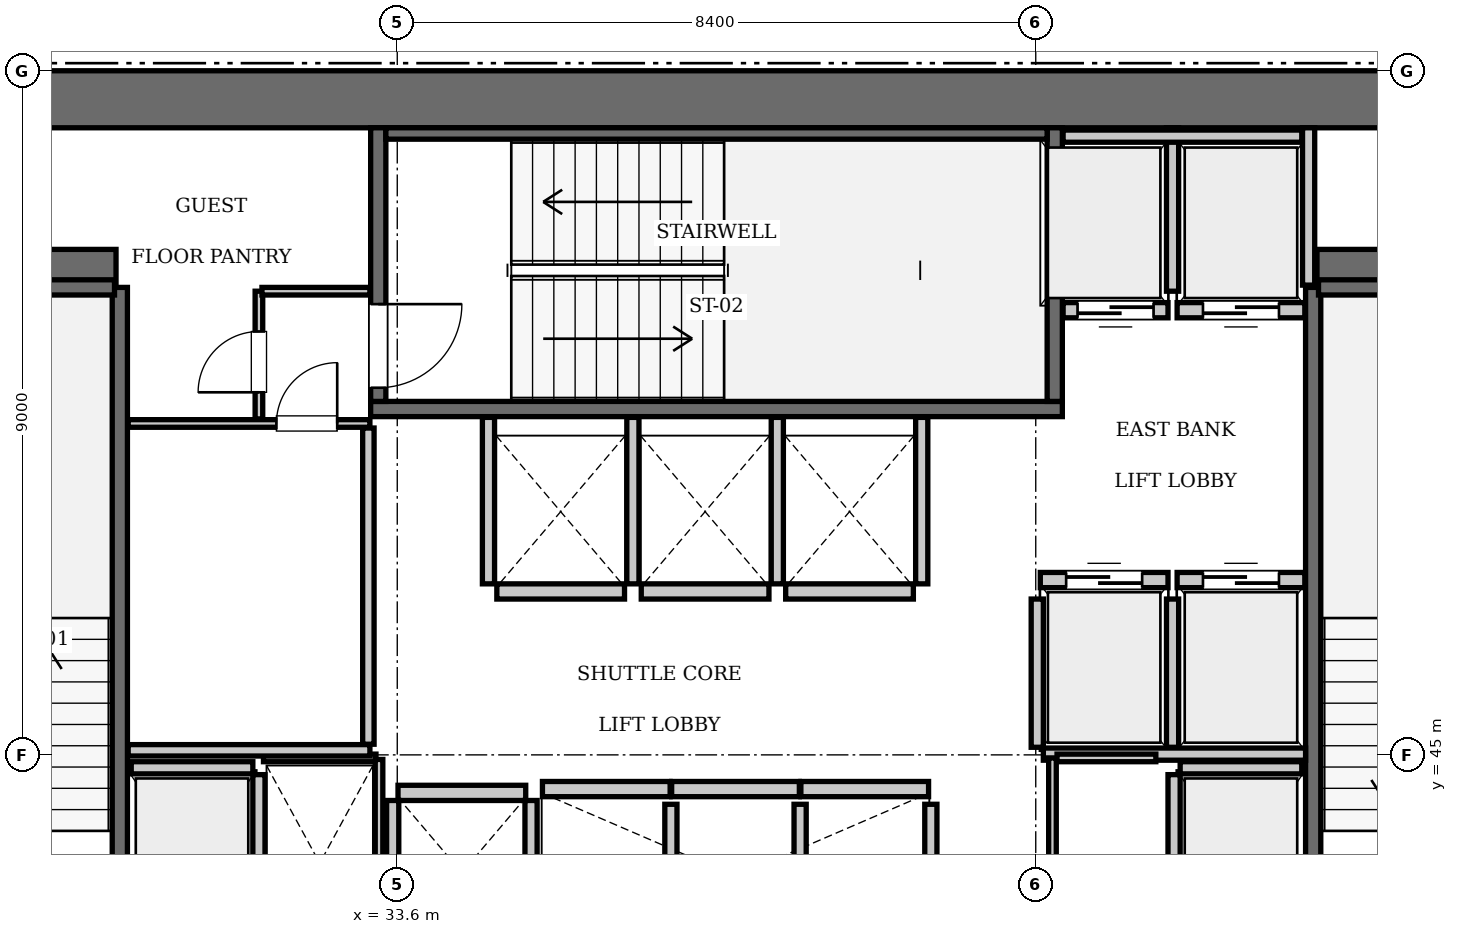
"""IFC4 building model, lengths in metres.
Left out: names, types, materials, properties, quantities, classifications, styles, units other than length and angle.
Written with IfcOpenShell. Run it as: python <this file> out.ifc"""

import sys

from ifc_helpers import new_model, si_unit, direction, frame, frame_2d, origin, place, context, subcontext, project, spatial, rectangle, extrude, element, fill, save


model = new_model("IFC4")
c1 = context("Model", 3, precision=1e-05, world=origin(), true_north=direction((0.0, 1.0)))
c2 = subcontext(c1, "Body", "Model", "MODEL_VIEW")
j1 = project(units=[si_unit("LENGTHUNIT", "METRE"), si_unit("PLANEANGLEUNIT", "RADIAN")], contexts=[c1])
p1 = place(None, origin())
s1 = spatial("IfcSite", under=j1, at=p1, CompositionType="ELEMENT")
p2 = place(p1, origin())
s2 = spatial("IfcBuilding", under=s1, at=p2, CompositionType="ELEMENT")
p3 = place(p2, frame((0.0, 0.0, 177.45)))
s3 = spatial("IfcBuildingStorey", under=s2, at=p3, CompositionType="ELEMENT", Elevation=177.45)
p4 = place(p3, frame((25.2, 53.625, 0.0), z_axis=(0.0, 0.0, 1.0), x_axis=(1.0, 0.0, 0.0)))
e1 = element("IfcWall", 1, at=p4, inside=s3, PredefinedType="SHEAR", context=c2, shape_type="SweptSolid", body=[
    extrude(rectangle(XDim=25.2, YDim=0.75, at=frame_2d((12.6, 0.0))), origin(), (0.0, 0.0, 1.0), 3.85),
])
for number, where, z_axis, x_axis in (
    (2, (25.95, 51.4, 0.0), (0.0, 0.0, 1.0), (1.0, 0.0, 0.0)),
    (3, (45.7, 51.4, 0.0), (0.0, 0.0, 1.0), (1.0, 0.0, 0.0)),
):
    element("IfcWall", number, at=place(p3, frame(where, z_axis=z_axis, x_axis=x_axis)), inside=s3, PredefinedType="SHEAR", context=c2, shape_type="SweptSolid", body=[
        extrude(rectangle(XDim=3.95, YDim=0.5, at=frame_2d((1.975, 0.0))), origin(), (0.0, 0.0, 1.0), 3.85),
    ])
p5 = place(p3, frame((29.95, 42.15, 0.0), z_axis=(0.0, 0.0, 1.0), x_axis=(0.0, 1.0, 0.0)))
e4 = element("IfcWall", 4, at=p5, inside=s3, PredefinedType="SOLIDWALL", context=c2, shape_type="SweptSolid", body=[
    extrude(rectangle(XDim=9.0, YDim=0.2, at=frame_2d((4.5, 0.0))), origin(), (0.0, 0.0, 1.0), 3.61),
])
p6 = place(p3, frame((26.38, 51.15, 0.0), z_axis=(0.0, 0.0, 1.0), x_axis=(1.0, 0.0, 0.0)))
e5 = element("IfcWall", 5, at=p6, inside=s3, PredefinedType="SOLIDWALL", context=c2, shape_type="SweptSolid", body=[
    extrude(rectangle(XDim=3.5, YDim=0.2, at=frame_2d((1.75, 0.0))), origin(), (0.0, 0.0, 1.0), 3.61),
])
p7 = place(p3, frame((33.25, 49.55, 0.0), z_axis=(0.0, 0.0, 1.0), x_axis=(1.0, 0.0, 0.0)))
e6 = element("IfcWall", 6, at=p7, inside=s3, PredefinedType="SOLIDWALL", context=c2, shape_type="SweptSolid", body=[
    extrude(rectangle(XDim=9.1, YDim=0.2, at=frame_2d((4.55, 0.0))), origin(), (0.0, 0.0, 1.0), 3.61),
])
p8 = place(p3, frame((42.25, 49.65, 0.0), z_axis=(0.0, 0.0, 1.0), x_axis=(0.0, 1.0, 0.0)))
e7 = element("IfcWall", 7, at=p8, inside=s3, PredefinedType="SOLIDWALL", context=c2, shape_type="SweptSolid", body=[
    extrude(rectangle(XDim=3.6, YDim=0.2, at=frame_2d((1.8, 0.0))), origin(), (0.0, 0.0, 1.0), 3.61),
])
p9 = place(p3, frame((33.35, 49.65, 0.0), z_axis=(0.0, 0.0, 1.0), x_axis=(0.0, 1.0, 0.0)))
e8 = element("IfcWall", 8, at=p9, inside=s3, PredefinedType="SOLIDWALL", context=c2, shape_type="SweptSolid", body=[
    extrude(rectangle(XDim=3.6, YDim=0.2, at=frame_2d((1.8, 0.0))), origin(), (0.0, 0.0, 1.0), 3.61),
])
p10 = place(p9, frame((0.18, 0.0, 0.0)))
e9 = element("IfcOpeningElement", 9, at=p10, cuts=e8, PredefinedType="OPENING", context=c2, shape_type="SweptSolid", body=[
    extrude(rectangle(XDim=1.1, YDim=2.15, at=frame_2d((0.55, 1.075))), frame((0.0, 0.11, 0.0), z_axis=(0.0, -1.0, 0.0), x_axis=(1.0, 0.0, 0.0)), (0.0, 0.0, 1.0), 0.22),
])
p11 = place(p3, frame((33.45, 53.175, 0.0), z_axis=(0.0, 0.0, 1.0), x_axis=(1.0, 0.0, 0.0)))
e10 = element("IfcWall", 10, at=p11, inside=s3, PredefinedType="SOLIDWALL", context=c2, shape_type="SweptSolid", body=[
    extrude(rectangle(XDim=8.7, YDim=0.15, at=frame_2d((4.35, 0.0))), origin(), (0.0, 0.0, 1.0), 3.61),
])
p12 = place(p3, frame((45.65, 42.15, 0.0), z_axis=(0.0, 0.0, 1.0), x_axis=(0.0, 1.0, 0.0)))
e11 = element("IfcWall", 11, at=p12, inside=s3, PredefinedType="SOLIDWALL", context=c2, shape_type="SweptSolid", body=[
    extrude(rectangle(XDim=9.0, YDim=0.2, at=frame_2d((4.5, 0.0))), origin(), (0.0, 0.0, 1.0), 3.61),
])
p13 = place(p3, frame((45.72, 51.15, 0.0), z_axis=(0.0, 0.0, 1.0), x_axis=(1.0, 0.0, 0.0)))
e12 = element("IfcWall", 12, at=p13, inside=s3, PredefinedType="SOLIDWALL", context=c2, shape_type="SweptSolid", body=[
    extrude(rectangle(XDim=3.5, YDim=0.2, at=frame_2d((1.75, 0.0))), origin(), (0.0, 0.0, 1.0), 3.61),
])
p14 = place(p3, frame((42.06, 47.3, 0.0), z_axis=(0.0, 0.0, 1.0), x_axis=(1.0, 0.0, 0.0)))
e13 = element("IfcWall", 13, at=p14, inside=s3, PredefinedType="SOLIDWALL", context=c2, shape_type="SweptSolid", body=[
    extrude(rectangle(XDim=1.68, YDim=0.2, at=frame_2d((0.84, 0.0))), origin(), (0.0, 0.0, 1.0), 3.61),
])
p15 = place(p14, frame((0.34, 0.0, 0.0)))
e14 = element("IfcOpeningElement", 14, at=p15, cuts=e13, PredefinedType="OPENING", context=c2, shape_type="SweptSolid", body=[
    extrude(rectangle(XDim=1.0, YDim=2.15, at=frame_2d((0.5, 1.075))), frame((0.0, 0.11, 0.0), z_axis=(0.0, -1.0, 0.0), x_axis=(1.0, 0.0, 0.0)), (0.0, 0.0, 1.0), 0.22),
])
p16 = place(p3, frame((43.86, 47.3, 0.0), z_axis=(0.0, 0.0, 1.0), x_axis=(1.0, 0.0, 0.0)))
e15 = element("IfcWall", 15, at=p16, inside=s3, PredefinedType="SOLIDWALL", context=c2, shape_type="SweptSolid", body=[
    extrude(rectangle(XDim=1.68, YDim=0.2, at=frame_2d((0.84, 0.0))), origin(), (0.0, 0.0, 1.0), 3.61),
])
p17 = place(p16, frame((0.34, 0.0, 0.0)))
e16 = element("IfcOpeningElement", 16, at=p17, cuts=e15, PredefinedType="OPENING", context=c2, shape_type="SweptSolid", body=[
    extrude(rectangle(XDim=1.0, YDim=2.15, at=frame_2d((0.5, 1.075))), frame((0.0, 0.11, 0.0), z_axis=(0.0, -1.0, 0.0), x_axis=(1.0, 0.0, 0.0)), (0.0, 0.0, 1.0), 0.22),
])
p18 = place(p3, frame((42.36, 50.85, 0.0), z_axis=(0.0, 0.0, 1.0), x_axis=(1.0, 0.0, 0.0)))
e17 = element("IfcWall", 17, at=p18, inside=s3, PredefinedType="SOLIDWALL", context=c2, shape_type="SweptSolid", body=[
    extrude(rectangle(XDim=1.38, YDim=0.2, at=frame_2d((0.69, 0.0))), origin(), (0.0, 0.0, 1.0), 3.61),
])
p19 = place(p18, frame((0.19, 0.0, 0.0)))
e18 = element("IfcOpeningElement", 18, at=p19, cuts=e17, PredefinedType="OPENING", context=c2, shape_type="SweptSolid", body=[
    extrude(rectangle(XDim=1.0, YDim=2.15, at=frame_2d((0.5, 1.075))), frame((0.0, 0.11, 0.0), z_axis=(0.0, -1.0, 0.0), x_axis=(1.0, 0.0, 0.0)), (0.0, 0.0, 1.0), 0.22),
])
p20 = place(p3, frame((43.86, 50.85, 0.0), z_axis=(0.0, 0.0, 1.0), x_axis=(1.0, 0.0, 0.0)))
e19 = element("IfcWall", 19, at=p20, inside=s3, PredefinedType="SOLIDWALL", context=c2, shape_type="SweptSolid", body=[
    extrude(rectangle(XDim=1.68, YDim=0.2, at=frame_2d((0.84, 0.0))), origin(), (0.0, 0.0, 1.0), 3.61),
])
p21 = place(p20, frame((0.34, 0.0, 0.0)))
e20 = element("IfcOpeningElement", 20, at=p21, cuts=e19, PredefinedType="OPENING", context=c2, shape_type="SweptSolid", body=[
    extrude(rectangle(XDim=1.0, YDim=2.15, at=frame_2d((0.5, 1.075))), frame((0.0, 0.11, 0.0), z_axis=(0.0, -1.0, 0.0), x_axis=(1.0, 0.0, 0.0)), (0.0, 0.0, 1.0), 0.22),
])
for number, where, z_axis, x_axis in (
    (21, (35.51, 44.55, 0.0), (0.0, 0.0, 1.0), (1.0, 0.0, 0.0)),
    (22, (37.21, 44.55, 0.0), (0.0, 0.0, 1.0), (1.0, 0.0, 0.0)),
):
    element("IfcWall", number, at=place(p3, frame(where, z_axis=z_axis, x_axis=x_axis)), inside=s3, PredefinedType="SOLIDWALL", context=c2, shape_type="SweptSolid", body=[
        extrude(rectangle(XDim=1.68, YDim=0.2, at=frame_2d((0.84, 0.0))), origin(), (0.0, 0.0, 1.0), 3.61),
    ])
for number, where, z_axis, x_axis in (
    (23, (38.91, 44.55, 0.0), (0.0, 0.0, 1.0), (1.0, 0.0, 0.0)),
    (24, (34.91, 47.15, 0.0), (0.0, 0.0, 1.0), (1.0, 0.0, 0.0)),
):
    element("IfcWall", number, at=place(p3, frame(where, z_axis=z_axis, x_axis=x_axis)), inside=s3, PredefinedType="SOLIDWALL", context=c2, shape_type="SweptSolid", body=[
        extrude(rectangle(XDim=1.68, YDim=0.2, at=frame_2d((0.84, 0.0))), origin(), (0.0, 0.0, 1.0), 3.61),
    ])
for number, where, z_axis, x_axis in (
    (25, (36.81, 47.15, 0.0), (0.0, 0.0, 1.0), (1.0, 0.0, 0.0)),
    (26, (38.71, 47.15, 0.0), (0.0, 0.0, 1.0), (1.0, 0.0, 0.0)),
    (27, (33.61, 44.5, 0.0), (0.0, 0.0, 1.0), (1.0, 0.0, 0.0)),
):
    element("IfcWall", number, at=place(p3, frame(where, z_axis=z_axis, x_axis=x_axis)), inside=s3, PredefinedType="SOLIDWALL", context=c2, shape_type="SweptSolid", body=[
        extrude(rectangle(XDim=1.68, YDim=0.2, at=frame_2d((0.84, 0.0))), origin(), (0.0, 0.0, 1.0), 3.61),
    ])
p22 = place(p3, frame((30.1, 44.83, 0.0), z_axis=(0.0, 0.0, 1.0), x_axis=(1.0, 0.0, 0.0)))
e28 = element("IfcWall", 28, at=p22, inside=s3, PredefinedType="SOLIDWALL", context=c2, shape_type="SweptSolid", body=[
    extrude(rectangle(XDim=1.6, YDim=0.16, at=frame_2d((0.8, 0.0))), origin(), (0.0, 0.0, 1.0), 3.61),
])
p23 = place(p3, frame((31.78, 42.15, 0.0), z_axis=(0.0, 0.0, 1.0), x_axis=(0.0, 1.0, 0.0)))
e29 = element("IfcWall", 29, at=p23, inside=s3, PredefinedType="SOLIDWALL", context=c2, shape_type="SweptSolid", body=[
    extrude(rectangle(XDim=2.59, YDim=0.16, at=frame_2d((1.295, 0.0))), origin(), (0.0, 0.0, 1.0), 3.61),
])
p24 = place(p3, frame((43.9, 44.83, 0.0), z_axis=(0.0, 0.0, 1.0), x_axis=(1.0, 0.0, 0.0)))
e30 = element("IfcWall", 30, at=p24, inside=s3, PredefinedType="SOLIDWALL", context=c2, shape_type="SweptSolid", body=[
    extrude(rectangle(XDim=1.6, YDim=0.16, at=frame_2d((0.8, 0.0))), origin(), (0.0, 0.0, 1.0), 3.61),
])
p25 = place(p3, frame((43.82, 42.15, 0.0), z_axis=(0.0, 0.0, 1.0), x_axis=(0.0, 1.0, 0.0)))
e31 = element("IfcWall", 31, at=p25, inside=s3, PredefinedType="SOLIDWALL", context=c2, shape_type="SweptSolid", body=[
    extrude(rectangle(XDim=2.59, YDim=0.16, at=frame_2d((1.295, 0.0))), origin(), (0.0, 0.0, 1.0), 3.61),
])
for number, where, z_axis, x_axis in (
    (32, (42.02, 45.1, 0.0), (0.0, 0.0, 1.0), (0.0, 1.0, 0.0)),
    (33, (43.8, 45.1, 0.0), (0.0, 0.0, 1.0), (0.0, 1.0, 0.0)),
):
    element("IfcWall", number, at=place(p3, frame(where, z_axis=z_axis, x_axis=x_axis)), inside=s3, PredefinedType="SOLIDWALL", context=c2, shape_type="SweptSolid", body=[
        extrude(rectangle(XDim=1.95, YDim=0.16, at=frame_2d((0.975, 0.0))), origin(), (0.0, 0.0, 1.0), 3.61),
    ])
p26 = place(p3, frame((42.1, 45.01, 0.0), z_axis=(0.0, 0.0, 1.0), x_axis=(1.0, 0.0, 0.0)))
e34 = element("IfcWall", 34, at=p26, inside=s3, PredefinedType="SOLIDWALL", context=c2, shape_type="SweptSolid", body=[
    extrude(rectangle(XDim=3.45, YDim=0.16, at=frame_2d((1.725, 0.0))), origin(), (0.0, 0.0, 1.0), 3.61),
])
p27 = place(p3, frame((45.59, 51.18, 0.0), z_axis=(0.0, 0.0, 1.0), x_axis=(0.0, 1.0, 0.0)))
e35 = element("IfcWall", 35, at=p27, inside=s3, PredefinedType="SOLIDWALL", context=c2, shape_type="SweptSolid", body=[
    extrude(rectangle(XDim=2.07, YDim=0.16, at=frame_2d((1.035, 0.0))), origin(), (0.0, 0.0, 1.0), 3.61),
])
p28 = place(p3, frame((43.8, 51.1, 0.0), z_axis=(0.0, 0.0, 1.0), x_axis=(0.0, 1.0, 0.0)))
e36 = element("IfcWall", 36, at=p28, inside=s3, PredefinedType="SOLIDWALL", context=c2, shape_type="SweptSolid", body=[
    extrude(rectangle(XDim=2.15, YDim=0.16, at=frame_2d((1.075, 0.0))), origin(), (0.0, 0.0, 1.0), 3.61),
])
p29 = place(p3, frame((42.36, 53.14, 0.0), z_axis=(0.0, 0.0, 1.0), x_axis=(1.0, 0.0, 0.0)))
e37 = element("IfcWall", 37, at=p29, inside=s3, PredefinedType="SOLIDWALL", context=c2, shape_type="SweptSolid", body=[
    extrude(rectangle(XDim=3.14, YDim=0.16, at=frame_2d((1.57, 0.0))), origin(), (0.0, 0.0, 1.0), 3.61),
])
for number, where, z_axis, x_axis in (
    (38, (37.2, 42.15, 0.0), (0.0, 0.0, 1.0), (0.0, 1.0, 0.0)),
    (39, (38.9, 42.15, 0.0), (0.0, 0.0, 1.0), (0.0, 1.0, 0.0)),
    (40, (40.62, 42.15, 0.0), (0.0, 0.0, 1.0), (0.0, 1.0, 0.0)),
):
    element("IfcWall", number, at=place(p3, frame(where, z_axis=z_axis, x_axis=x_axis)), inside=s3, PredefinedType="SOLIDWALL", context=c2, shape_type="SweptSolid", body=[
        extrude(rectangle(XDim=2.2, YDim=0.16, at=frame_2d((1.1, 0.0))), origin(), (0.0, 0.0, 1.0), 3.61),
    ])
for number, where, z_axis, x_axis in (
    (41, (34.8, 47.25, 0.0), (0.0, 0.0, 1.0), (0.0, 1.0, 0.0)),
    (42, (36.7, 47.25, 0.0), (0.0, 0.0, 1.0), (0.0, 1.0, 0.0)),
    (43, (38.6, 47.25, 0.0), (0.0, 0.0, 1.0), (0.0, 1.0, 0.0)),
    (44, (40.5, 47.25, 0.0), (0.0, 0.0, 1.0), (0.0, 1.0, 0.0)),
):
    element("IfcWall", number, at=place(p3, frame(where, z_axis=z_axis, x_axis=x_axis)), inside=s3, PredefinedType="SOLIDWALL", context=c2, shape_type="SweptSolid", body=[
        extrude(rectangle(XDim=2.19, YDim=0.16, at=frame_2d((1.095, 0.0))), origin(), (0.0, 0.0, 1.0), 3.61),
    ])
for number, where, z_axis, x_axis in (
    (45, (33.54, 42.15, 0.0), (0.0, 0.0, 1.0), (0.0, 1.0, 0.0)),
    (46, (35.36, 42.15, 0.0), (0.0, 0.0, 1.0), (0.0, 1.0, 0.0)),
):
    element("IfcWall", number, at=place(p3, frame(where, z_axis=z_axis, x_axis=x_axis)), inside=s3, PredefinedType="SOLIDWALL", context=c2, shape_type="SweptSolid", body=[
        extrude(rectangle(XDim=2.25, YDim=0.16, at=frame_2d((1.125, 0.0))), origin(), (0.0, 0.0, 1.0), 3.61),
    ])
p30 = place(p3, frame((31.84, 44.96, 0.0), z_axis=(0.0, 0.0, 1.0), x_axis=(1.0, 0.0, 0.0)))
e47 = element("IfcWall", 47, at=p30, inside=s3, PredefinedType="PARTITIONING", context=c2, shape_type="SweptSolid", body=[
    extrude(rectangle(XDim=1.48, YDim=0.1, at=frame_2d((0.74, 0.0))), origin(), (0.0, 0.0, 1.0), 3.61),
])
p31 = place(p3, frame((33.36, 42.21, 0.0), z_axis=(0.0, 0.0, 1.0), x_axis=(0.0, 1.0, 0.0)))
e48 = element("IfcWall", 48, at=p31, inside=s3, PredefinedType="PARTITIONING", context=c2, shape_type="SweptSolid", body=[
    extrude(rectangle(XDim=2.73, YDim=0.1, at=frame_2d((1.365, 0.0))), origin(), (0.0, 0.0, 1.0), 3.61),
])
p32 = place(p3, frame((42.22, 42.2, 0.0), z_axis=(0.0, 0.0, 1.0), x_axis=(0.0, 1.0, 0.0)))
e49 = element("IfcWall", 49, at=p32, inside=s3, PredefinedType="PARTITIONING", context=c2, shape_type="SweptSolid", body=[
    extrude(rectangle(XDim=2.76, YDim=0.1, at=frame_2d((1.38, 0.0))), origin(), (0.0, 0.0, 1.0), 3.61),
])
p33 = place(p32, frame((0.65, 0.0, 0.0)))
e50 = element("IfcOpeningElement", 50, at=p33, cuts=e49, PredefinedType="OPENING", context=c2, shape_type="SweptSolid", body=[
    extrude(rectangle(XDim=0.8, YDim=2.05, at=frame_2d((0.4, 1.025))), frame((0.0, 0.06, 0.0), z_axis=(0.0, -1.0, 0.0), x_axis=(1.0, 0.0, 0.0)), (0.0, 0.0, 1.0), 0.12),
])
p34 = place(p3, frame((42.28, 44.96, 0.0), z_axis=(0.0, 0.0, 1.0), x_axis=(1.0, 0.0, 0.0)))
e51 = element("IfcWall", 51, at=p34, inside=s3, PredefinedType="PARTITIONING", context=c2, shape_type="SweptSolid", body=[
    extrude(rectangle(XDim=1.3, YDim=0.1, at=frame_2d((0.65, 0.0))), origin(), (0.0, 0.0, 1.0), 3.61),
])
p35 = place(p3, frame((30.06, 45.06, 0.0), z_axis=(0.0, 0.0, 1.0), x_axis=(1.0, 0.0, 0.0)))
e52 = element("IfcWall", 52, at=p35, inside=s3, PredefinedType="PARTITIONING", context=c2, shape_type="SweptSolid", body=[
    extrude(rectangle(XDim=3.18, YDim=0.15, at=frame_2d((1.59, 0.0))), origin(), (0.0, 0.0, 1.0), 3.61),
])
p36 = place(p3, frame((33.22, 45.14, 0.0), z_axis=(0.0, 0.0, 1.0), x_axis=(0.0, 1.0, 0.0)))
e53 = element("IfcWall", 53, at=p36, inside=s3, PredefinedType="PARTITIONING", context=c2, shape_type="SweptSolid", body=[
    extrude(rectangle(XDim=4.16, YDim=0.15, at=frame_2d((2.08, 0.0))), origin(), (0.0, 0.0, 1.0), 3.61),
])
p37 = place(p3, frame((30.06, 49.36, 0.0), z_axis=(0.0, 0.0, 1.0), x_axis=(1.0, 0.0, 0.0)))
e54 = element("IfcWall", 54, at=p37, inside=s3, PredefinedType="PARTITIONING", context=c2, shape_type="SweptSolid", body=[
    extrude(rectangle(XDim=3.18, YDim=0.1, at=frame_2d((1.59, 0.0))), origin(), (0.0, 0.0, 1.0), 3.61),
])
p38 = place(p37, frame((1.95, 0.0, 0.0)))
e55 = element("IfcOpeningElement", 55, at=p38, cuts=e54, PredefinedType="OPENING", context=c2, shape_type="SweptSolid", body=[
    extrude(rectangle(XDim=0.8, YDim=2.05, at=frame_2d((0.4, 1.025))), frame((0.0, 0.06, 0.0), z_axis=(0.0, -1.0, 0.0), x_axis=(1.0, 0.0, 0.0)), (0.0, 0.0, 1.0), 0.12),
])
p39 = place(p3, frame((31.78, 49.42, 0.0), z_axis=(0.0, 0.0, 1.0), x_axis=(0.0, 1.0, 0.0)))
e56 = element("IfcWall", 56, at=p39, inside=s3, PredefinedType="PARTITIONING", context=c2, shape_type="SweptSolid", body=[
    extrude(rectangle(XDim=1.68, YDim=0.1, at=frame_2d((0.84, 0.0))), origin(), (0.0, 0.0, 1.0), 3.61),
])
p40 = place(p39, frame((0.35, 0.0, 0.0)))
e57 = element("IfcOpeningElement", 57, at=p40, cuts=e56, PredefinedType="OPENING", context=c2, shape_type="SweptSolid", body=[
    extrude(rectangle(XDim=0.8, YDim=2.05, at=frame_2d((0.4, 1.025))), frame((0.0, 0.06, 0.0), z_axis=(0.0, -1.0, 0.0), x_axis=(1.0, 0.0, 0.0)), (0.0, 0.0, 1.0), 0.12),
])
p41 = place(p3, frame((31.82, 51.1, 0.0), z_axis=(0.0, 0.0, 1.0), x_axis=(1.0, 0.0, 0.0)))
e58 = element("IfcWall", 58, at=p41, inside=s3, PredefinedType="PARTITIONING", context=c2, shape_type="SweptSolid", body=[
    extrude(rectangle(XDim=1.42, YDim=0.1, at=frame_2d((0.71, 0.0))), origin(), (0.0, 0.0, 1.0), 3.61),
])
p42 = place(p10, frame((1.1, 0.0, 0.0), z_axis=(0.0, 0.0, 1.0), x_axis=(-1.0, 0.0, 0.0)))
e59 = element("IfcDoor", 59, at=p42, inside=s3, OperationType="SINGLE_SWING_LEFT", PredefinedType="DOOR", context=c2, shape_type="SweptSolid", body=[
    extrude(rectangle(XDim=1.1, YDim=2.15, at=frame_2d((0.55, 1.075))), frame((0.0, 0.025, 0.0), z_axis=(0.0, -1.0, 0.0), x_axis=(1.0, 0.0, 0.0)), (0.0, 0.0, 1.0), 0.05),
])
fill(e9, e59)
p43 = place(p15, origin())
e60 = element("IfcDoor", 60, at=p43, inside=s3, OperationType="SLIDING_TO_LEFT", PredefinedType="DOOR", context=c2, shape_type="SweptSolid", body=[
    extrude(rectangle(XDim=1.0, YDim=2.15, at=frame_2d((0.5, 1.075))), frame((0.0, 0.025, 0.0), z_axis=(0.0, -1.0, 0.0), x_axis=(1.0, 0.0, 0.0)), (0.0, 0.0, 1.0), 0.05),
])
fill(e14, e60)
p44 = place(p17, origin())
e61 = element("IfcDoor", 61, at=p44, inside=s3, OperationType="SLIDING_TO_LEFT", PredefinedType="DOOR", context=c2, shape_type="SweptSolid", body=[
    extrude(rectangle(XDim=1.0, YDim=2.15, at=frame_2d((0.5, 1.075))), frame((0.0, 0.025, 0.0), z_axis=(0.0, -1.0, 0.0), x_axis=(1.0, 0.0, 0.0)), (0.0, 0.0, 1.0), 0.05),
])
fill(e16, e61)
p45 = place(p19, frame((1.0, 0.0, 0.0), z_axis=(0.0, 0.0, 1.0), x_axis=(-1.0, 0.0, 0.0)))
e62 = element("IfcDoor", 62, at=p45, inside=s3, OperationType="SLIDING_TO_LEFT", PredefinedType="DOOR", context=c2, shape_type="SweptSolid", body=[
    extrude(rectangle(XDim=1.0, YDim=2.15, at=frame_2d((0.5, 1.075))), frame((0.0, 0.025, 0.0), z_axis=(0.0, -1.0, 0.0), x_axis=(1.0, 0.0, 0.0)), (0.0, 0.0, 1.0), 0.05),
])
fill(e18, e62)
p46 = place(p21, frame((1.0, 0.0, 0.0), z_axis=(0.0, 0.0, 1.0), x_axis=(-1.0, 0.0, 0.0)))
e63 = element("IfcDoor", 63, at=p46, inside=s3, OperationType="SLIDING_TO_LEFT", PredefinedType="DOOR", context=c2, shape_type="SweptSolid", body=[
    extrude(rectangle(XDim=1.0, YDim=2.15, at=frame_2d((0.5, 1.075))), frame((0.0, 0.025, 0.0), z_axis=(0.0, -1.0, 0.0), x_axis=(1.0, 0.0, 0.0)), (0.0, 0.0, 1.0), 0.05),
])
fill(e20, e63)
p47 = place(p38, origin())
e64 = element("IfcDoor", 64, at=p47, inside=s3, OperationType="SINGLE_SWING_RIGHT", PredefinedType="DOOR", context=c2, shape_type="SweptSolid", body=[
    extrude(rectangle(XDim=0.8, YDim=2.05, at=frame_2d((0.4, 1.025))), frame((0.0, 0.025, 0.0), z_axis=(0.0, -1.0, 0.0), x_axis=(1.0, 0.0, 0.0)), (0.0, 0.0, 1.0), 0.05),
])
fill(e55, e64)
p48 = place(p40, origin())
e65 = element("IfcDoor", 65, at=p48, inside=s3, OperationType="SINGLE_SWING_LEFT", PredefinedType="DOOR", context=c2, shape_type="SweptSolid", body=[
    extrude(rectangle(XDim=0.8, YDim=2.05, at=frame_2d((0.4, 1.025))), frame((0.0, 0.025, 0.0), z_axis=(0.0, -1.0, 0.0), x_axis=(1.0, 0.0, 0.0)), (0.0, 0.0, 1.0), 0.05),
])
fill(e57, e65)
save(model, sys.argv[1])
